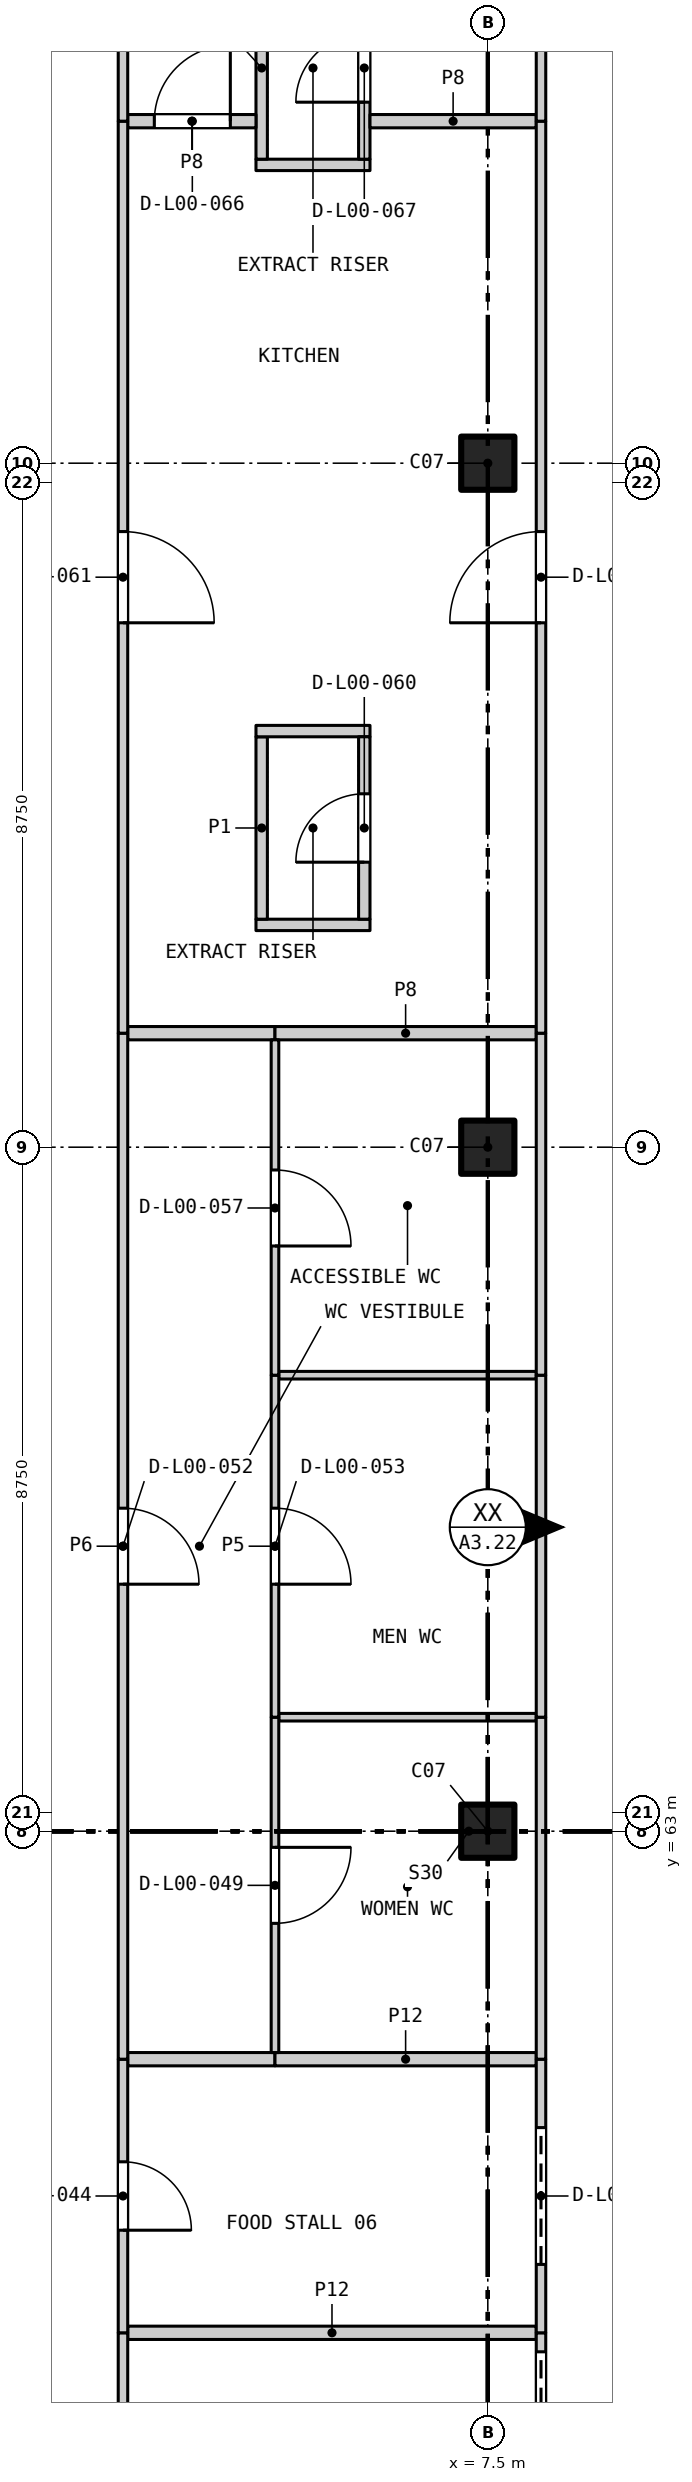
"""IFC4 building model, lengths in metres.
Left out: names, types, materials, properties, quantities, classifications, styles, units other than length and angle.
Written with IfcOpenShell. Run it as: python <this file> out.ifc"""

import sys

from ifc_helpers import new_model, si_unit, direction, frame, frame_2d, origin, origin_2d, place, context, subcontext, project, spatial, rectangle, extrude, element, fill, save


model = new_model("IFC4")
c1 = context("Model", 3, precision=1e-05, world=origin(), true_north=direction((0.0, 1.0)))
c2 = subcontext(c1, "Body", "Model", "MODEL_VIEW")
j1 = project(units=[si_unit("LENGTHUNIT", "METRE"), si_unit("PLANEANGLEUNIT", "RADIAN")], contexts=[c1])
p1 = place(None, origin())
s1 = spatial("IfcSite", under=j1, at=p1, CompositionType="ELEMENT")
p2 = place(p1, origin())
s2 = spatial("IfcBuilding", under=s1, at=p2, CompositionType="ELEMENT")
p3 = place(p2, origin())
s3 = spatial("IfcBuildingStorey", under=s2, at=p3, CompositionType="ELEMENT", Elevation=0.0)
for number, where, z_axis, x_axis in (
    (1, (7.5, 63.0, 0.0), (0.0, 0.0, 1.0), (1.0, 0.0, 0.0)),
    (2, (7.5, 72.0, 0.0), (0.0, 0.0, 1.0), (1.0, 0.0, 0.0)),
    (3, (7.5, 81.0, 0.0), (0.0, 0.0, 1.0), (1.0, 0.0, 0.0)),
):
    element("IfcColumn", number, at=place(p3, frame(where, z_axis=z_axis, x_axis=x_axis)), inside=s3, PredefinedType="COLUMN", context=c2, shape_type="SweptSolid", body=[
        extrude(rectangle(XDim=0.7, YDim=0.7, at=origin_2d()), origin(), (0.0, 0.0, 1.0), 6.0),
    ])
p4 = place(p3, frame((4.45, 74.925, 0.0), z_axis=(0.0, 0.0, 1.0), x_axis=(1.0, 0.0, 0.0)))
e4 = element("IfcWall", 4, at=p4, inside=s3, PredefinedType="PARTITIONING", context=c2, shape_type="SweptSolid", body=[
    extrude(rectangle(XDim=1.5, YDim=0.15, at=frame_2d((0.75, 0.0))), origin(), (0.0, 0.0, 1.0), 5.8),
])
p5 = place(p3, frame((4.525, 75.0, 0.0), z_axis=(0.0, 0.0, 1.0), x_axis=(0.0, 1.0, 0.0)))
e5 = element("IfcWall", 5, at=p5, inside=s3, PredefinedType="PARTITIONING", context=c2, shape_type="SweptSolid", body=[
    extrude(rectangle(XDim=2.4, YDim=0.15, at=frame_2d((1.2, 0.0))), origin(), (0.0, 0.0, 1.0), 5.8),
])
for number, where, z_axis, x_axis in (
    (6, (4.45, 77.475, 0.0), (0.0, 0.0, 1.0), (1.0, 0.0, 0.0)),
    (7, (4.45, 84.925, 0.0), (0.0, 0.0, 1.0), (1.0, 0.0, 0.0)),
):
    element("IfcWall", number, at=place(p3, frame(where, z_axis=z_axis, x_axis=x_axis)), inside=s3, PredefinedType="PARTITIONING", context=c2, shape_type="SweptSolid", body=[
        extrude(rectangle(XDim=1.5, YDim=0.15, at=frame_2d((0.75, 0.0))), origin(), (0.0, 0.0, 1.0), 5.8),
    ])
p6 = place(p3, frame((4.525, 85.0, 0.0), z_axis=(0.0, 0.0, 1.0), x_axis=(0.0, 1.0, 0.0)))
e8 = element("IfcWall", 8, at=p6, inside=s3, PredefinedType="PARTITIONING", context=c2, shape_type="SweptSolid", body=[
    extrude(rectangle(XDim=2.4, YDim=0.15, at=frame_2d((1.2, 0.0))), origin(), (0.0, 0.0, 1.0), 5.8),
])
p7 = place(p3, frame((5.875, 75.0, 0.0), z_axis=(0.0, 0.0, 1.0), x_axis=(0.0, 1.0, 0.0)))
e9 = element("IfcWall", 9, at=p7, inside=s3, PredefinedType="PARTITIONING", context=c2, shape_type="SweptSolid", body=[
    extrude(rectangle(XDim=2.4, YDim=0.15, at=frame_2d((1.2, 0.0))), origin(), (0.0, 0.0, 1.0), 5.8),
])
p8 = place(p7, frame((0.75, 0.0, 0.0)))
e10 = element("IfcOpeningElement", 10, at=p8, cuts=e9, PredefinedType="OPENING", context=c2, shape_type="SweptSolid", body=[
    extrude(rectangle(XDim=0.9, YDim=2.1, at=frame_2d((0.45, 1.05))), frame((0.0, 0.085, 0.0), z_axis=(0.0, -1.0, 0.0), x_axis=(1.0, 0.0, 0.0)), (0.0, 0.0, 1.0), 0.17),
])
p9 = place(p3, frame((5.875, 85.0, 0.0), z_axis=(0.0, 0.0, 1.0), x_axis=(0.0, 1.0, 0.0)))
e11 = element("IfcWall", 11, at=p9, inside=s3, PredefinedType="PARTITIONING", context=c2, shape_type="SweptSolid", body=[
    extrude(rectangle(XDim=2.4, YDim=0.15, at=frame_2d((1.2, 0.0))), origin(), (0.0, 0.0, 1.0), 5.8),
])
p10 = place(p9, frame((0.75, 0.0, 0.0)))
e12 = element("IfcOpeningElement", 12, at=p10, cuts=e11, PredefinedType="OPENING", context=c2, shape_type="SweptSolid", body=[
    extrude(rectangle(XDim=0.9, YDim=2.1, at=frame_2d((0.45, 1.05))), frame((0.0, 0.085, 0.0), z_axis=(0.0, -1.0, 0.0), x_axis=(1.0, 0.0, 0.0)), (0.0, 0.0, 1.0), 0.17),
])
p11 = place(p3, frame((2.762, 56.4, 0.0), z_axis=(0.0, 0.0, 1.0), x_axis=(1.0, 0.0, 0.0)))
e13 = element("IfcWall", 13, at=p11, inside=s3, PredefinedType="PARTITIONING", context=c2, shape_type="SweptSolid", body=[
    extrude(rectangle(XDim=5.375, YDim=0.175, at=frame_2d((2.688, 0.0))), origin(), (0.0, 0.0, 1.0), 3.0),
])
p12 = place(p3, frame((2.762, 60.0, 0.0), z_axis=(0.0, 0.0, 1.0), x_axis=(1.0, 0.0, 0.0)))
e14 = element("IfcWall", 14, at=p12, inside=s3, PredefinedType="PARTITIONING", context=c2, shape_type="SweptSolid", body=[
    extrude(rectangle(XDim=1.938, YDim=0.175, at=frame_2d((0.969, 0.0))), origin(), (0.0, 0.0, 1.0), 3.0),
])
p13 = place(p3, frame((4.7, 60.0, 0.0), z_axis=(0.0, 0.0, 1.0), x_axis=(1.0, 0.0, 0.0)))
e15 = element("IfcWall", 15, at=p13, inside=s3, PredefinedType="PARTITIONING", context=c2, shape_type="SweptSolid", body=[
    extrude(rectangle(XDim=3.438, YDim=0.175, at=frame_2d((1.719, 0.0))), origin(), (0.0, 0.0, 1.0), 3.0),
])
for number, where, z_axis, x_axis in (
    (16, (4.75, 64.5, 0.0), (0.0, 0.0, 1.0), (1.0, 0.0, 0.0)),
    (17, (4.75, 69.0, 0.0), (0.0, 0.0, 1.0), (1.0, 0.0, 0.0)),
):
    element("IfcWall", number, at=place(p3, frame(where, z_axis=z_axis, x_axis=x_axis)), inside=s3, PredefinedType="PARTITIONING", context=c2, shape_type="SweptSolid", body=[
        extrude(rectangle(XDim=3.387, YDim=0.1, at=frame_2d((1.694, 0.0))), origin(), (0.0, 0.0, 1.0), 5.8),
    ])
p14 = place(p3, frame((2.762, 73.5, 0.0), z_axis=(0.0, 0.0, 1.0), x_axis=(1.0, 0.0, 0.0)))
e18 = element("IfcWall", 18, at=p14, inside=s3, PredefinedType="PARTITIONING", context=c2, shape_type="SweptSolid", body=[
    extrude(rectangle(XDim=1.938, YDim=0.175, at=frame_2d((0.969, 0.0))), origin(), (0.0, 0.0, 1.0), 5.8),
])
p15 = place(p3, frame((4.7, 73.5, 0.0), z_axis=(0.0, 0.0, 1.0), x_axis=(1.0, 0.0, 0.0)))
e19 = element("IfcWall", 19, at=p15, inside=s3, PredefinedType="PARTITIONING", context=c2, shape_type="SweptSolid", body=[
    extrude(rectangle(XDim=3.438, YDim=0.175, at=frame_2d((1.719, 0.0))), origin(), (0.0, 0.0, 1.0), 5.8),
])
p16 = place(p3, frame((2.762, 85.5, 0.0), z_axis=(0.0, 0.0, 1.0), x_axis=(1.0, 0.0, 0.0)))
e20 = element("IfcWall", 20, at=p16, inside=s3, PredefinedType="PARTITIONING", context=c2, shape_type="SweptSolid", body=[
    extrude(rectangle(XDim=1.688, YDim=0.175, at=frame_2d((0.844, 0.0))), origin(), (0.0, 0.0, 1.0), 5.8),
])
p17 = place(p16, frame((0.35, 0.0, 0.0)))
e21 = element("IfcOpeningElement", 21, at=p17, cuts=e20, PredefinedType="OPENING", context=c2, shape_type="SweptSolid", body=[
    extrude(rectangle(XDim=1.0, YDim=2.1, at=frame_2d((0.5, 1.05))), frame((0.0, 0.097, 0.0), z_axis=(0.0, -1.0, 0.0), x_axis=(1.0, 0.0, 0.0)), (0.0, 0.0, 1.0), 0.195),
])
p18 = place(p3, frame((5.95, 85.5, 0.0), z_axis=(0.0, 0.0, 1.0), x_axis=(1.0, 0.0, 0.0)))
e22 = element("IfcWall", 22, at=p18, inside=s3, PredefinedType="PARTITIONING", context=c2, shape_type="SweptSolid", body=[
    extrude(rectangle(XDim=2.188, YDim=0.175, at=frame_2d((1.094, 0.0))), origin(), (0.0, 0.0, 1.0), 5.8),
])
p19 = place(p3, frame((2.7, 52.8, 0.0), z_axis=(0.0, 0.0, 1.0), x_axis=(0.0, 1.0, 0.0)))
e23 = element("IfcWall", 23, at=p19, inside=s3, PredefinedType="PARTITIONING", context=c2, shape_type="SweptSolid", body=[
    extrude(rectangle(XDim=3.6, YDim=0.125, at=frame_2d((1.8, 0.0))), origin(), (0.0, 0.0, 1.0), 3.0),
])
p20 = place(p19, frame((1.35, 0.0, 0.0)))
e24 = element("IfcOpeningElement", 24, at=p20, cuts=e23, PredefinedType="OPENING", context=c2, shape_type="SweptSolid", body=[
    extrude(rectangle(XDim=0.9, YDim=2.1, at=frame_2d((0.45, 1.05))), frame((0.0, 0.073, 0.0), z_axis=(0.0, -1.0, 0.0), x_axis=(1.0, 0.0, 0.0)), (0.0, 0.0, 1.0), 0.145),
])
p21 = place(p3, frame((2.7, 56.4, 0.0), z_axis=(0.0, 0.0, 1.0), x_axis=(0.0, 1.0, 0.0)))
e25 = element("IfcWall", 25, at=p21, inside=s3, PredefinedType="PARTITIONING", context=c2, shape_type="SweptSolid", body=[
    extrude(rectangle(XDim=3.6, YDim=0.125, at=frame_2d((1.8, 0.0))), origin(), (0.0, 0.0, 1.0), 3.0),
])
p22 = place(p21, frame((1.35, 0.0, 0.0)))
e26 = element("IfcOpeningElement", 26, at=p22, cuts=e25, PredefinedType="OPENING", context=c2, shape_type="SweptSolid", body=[
    extrude(rectangle(XDim=0.9, YDim=2.1, at=frame_2d((0.45, 1.05))), frame((0.0, 0.073, 0.0), z_axis=(0.0, -1.0, 0.0), x_axis=(1.0, 0.0, 0.0)), (0.0, 0.0, 1.0), 0.145),
])
p23 = place(p3, frame((2.7, 60.0, 0.0), z_axis=(0.0, 0.0, 1.0), x_axis=(0.0, 1.0, 0.0)))
e27 = element("IfcWall", 27, at=p23, inside=s3, PredefinedType="PARTITIONING", context=c2, shape_type="SweptSolid", body=[
    extrude(rectangle(XDim=13.5, YDim=0.125, at=frame_2d((6.75, 0.0))), origin(), (0.0, 0.0, 1.0), 5.8),
])
p24 = place(p23, frame((6.25, 0.0, 0.0)))
e28 = element("IfcOpeningElement", 28, at=p24, cuts=e27, PredefinedType="OPENING", context=c2, shape_type="SweptSolid", body=[
    extrude(rectangle(XDim=1.0, YDim=2.1, at=frame_2d((0.5, 1.05))), frame((0.0, 0.073, 0.0), z_axis=(0.0, -1.0, 0.0), x_axis=(1.0, 0.0, 0.0)), (0.0, 0.0, 1.0), 0.145),
])
p25 = place(p3, frame((2.7, 73.5, 0.0), z_axis=(0.0, 0.0, 1.0), x_axis=(0.0, 1.0, 0.0)))
e29 = element("IfcWall", 29, at=p25, inside=s3, PredefinedType="PARTITIONING", context=c2, shape_type="SweptSolid", body=[
    extrude(rectangle(XDim=12.0, YDim=0.125, at=frame_2d((6.0, 0.0))), origin(), (0.0, 0.0, 1.0), 5.8),
])
p26 = place(p25, frame((5.4, 0.0, 0.0)))
e30 = element("IfcOpeningElement", 30, at=p26, cuts=e29, PredefinedType="OPENING", context=c2, shape_type="SweptSolid", body=[
    extrude(rectangle(XDim=1.2, YDim=2.1, at=frame_2d((0.6, 1.05))), frame((0.0, 0.073, 0.0), z_axis=(0.0, -1.0, 0.0), x_axis=(1.0, 0.0, 0.0)), (0.0, 0.0, 1.0), 0.145),
])
p27 = place(p3, frame((2.7, 85.5, 0.0), z_axis=(0.0, 0.0, 1.0), x_axis=(0.0, 1.0, 0.0)))
e31 = element("IfcWall", 31, at=p27, inside=s3, PredefinedType="PARTITIONING", context=c2, shape_type="SweptSolid", body=[
    extrude(rectangle(XDim=3.438, YDim=0.125, at=frame_2d((1.719, 0.0))), origin(), (0.0, 0.0, 1.0), 5.8),
])
p28 = place(p3, frame((4.7, 60.087, 0.0), z_axis=(0.0, 0.0, 1.0), x_axis=(0.0, 1.0, 0.0)))
e32 = element("IfcWall", 32, at=p28, inside=s3, PredefinedType="PARTITIONING", context=c2, shape_type="SweptSolid", body=[
    extrude(rectangle(XDim=4.413, YDim=0.1, at=frame_2d((2.206, 0.0))), origin(), (0.0, 0.0, 1.0), 5.8),
])
p29 = place(p28, frame((1.7, 0.0, 0.0)))
e33 = element("IfcOpeningElement", 33, at=p29, cuts=e32, PredefinedType="OPENING", context=c2, shape_type="SweptSolid", body=[
    extrude(rectangle(XDim=1.0, YDim=2.1, at=frame_2d((0.5, 1.05))), frame((0.0, 0.06, 0.0), z_axis=(0.0, -1.0, 0.0), x_axis=(1.0, 0.0, 0.0)), (0.0, 0.0, 1.0), 0.12),
])
p30 = place(p3, frame((4.7, 64.5, 0.0), z_axis=(0.0, 0.0, 1.0), x_axis=(0.0, 1.0, 0.0)))
e34 = element("IfcWall", 34, at=p30, inside=s3, PredefinedType="PARTITIONING", context=c2, shape_type="SweptSolid", body=[
    extrude(rectangle(XDim=4.5, YDim=0.1, at=frame_2d((2.25, 0.0))), origin(), (0.0, 0.0, 1.0), 5.8),
])
p31 = place(p30, frame((1.75, 0.0, 0.0)))
e35 = element("IfcOpeningElement", 35, at=p31, cuts=e34, PredefinedType="OPENING", context=c2, shape_type="SweptSolid", body=[
    extrude(rectangle(XDim=1.0, YDim=2.1, at=frame_2d((0.5, 1.05))), frame((0.0, 0.06, 0.0), z_axis=(0.0, -1.0, 0.0), x_axis=(1.0, 0.0, 0.0)), (0.0, 0.0, 1.0), 0.12),
])
p32 = place(p3, frame((4.7, 69.0, 0.0), z_axis=(0.0, 0.0, 1.0), x_axis=(0.0, 1.0, 0.0)))
e36 = element("IfcWall", 36, at=p32, inside=s3, PredefinedType="PARTITIONING", context=c2, shape_type="SweptSolid", body=[
    extrude(rectangle(XDim=4.413, YDim=0.1, at=frame_2d((2.206, 0.0))), origin(), (0.0, 0.0, 1.0), 5.8),
])
p33 = place(p32, frame((1.7, 0.0, 0.0)))
e37 = element("IfcOpeningElement", 37, at=p33, cuts=e36, PredefinedType="OPENING", context=c2, shape_type="SweptSolid", body=[
    extrude(rectangle(XDim=1.0, YDim=2.1, at=frame_2d((0.5, 1.05))), frame((0.0, 0.06, 0.0), z_axis=(0.0, -1.0, 0.0), x_axis=(1.0, 0.0, 0.0)), (0.0, 0.0, 1.0), 0.12),
])
p34 = place(p3, frame((8.2, 52.8, 0.0), z_axis=(0.0, 0.0, 1.0), x_axis=(0.0, 1.0, 0.0)))
e38 = element("IfcWall", 38, at=p34, inside=s3, PredefinedType="PARTITIONING", context=c2, shape_type="SweptSolid", body=[
    extrude(rectangle(XDim=3.6, YDim=0.125, at=frame_2d((1.8, 0.0))), origin(), (0.0, 0.0, 1.0), 3.0),
])
p35 = place(p34, frame((1.55, 0.0, 0.0)))
e39 = element("IfcOpeningElement", 39, at=p35, cuts=e38, PredefinedType="OPENING", context=c2, shape_type="SweptSolid", body=[
    extrude(rectangle(XDim=1.8, YDim=2.4, at=frame_2d((0.9, 1.2))), frame((0.0, 0.073, 0.0), z_axis=(0.0, -1.0, 0.0), x_axis=(1.0, 0.0, 0.0)), (0.0, 0.0, 1.0), 0.145),
])
p36 = place(p3, frame((8.2, 56.4, 0.0), z_axis=(0.0, 0.0, 1.0), x_axis=(0.0, 1.0, 0.0)))
e40 = element("IfcWall", 40, at=p36, inside=s3, PredefinedType="PARTITIONING", context=c2, shape_type="SweptSolid", body=[
    extrude(rectangle(XDim=3.6, YDim=0.125, at=frame_2d((1.8, 0.0))), origin(), (0.0, 0.0, 1.0), 3.0),
])
p37 = place(p36, frame((0.9, 0.0, 0.0)))
e41 = element("IfcOpeningElement", 41, at=p37, cuts=e40, PredefinedType="OPENING", context=c2, shape_type="SweptSolid", body=[
    extrude(rectangle(XDim=1.8, YDim=2.4, at=frame_2d((0.9, 1.2))), frame((0.0, 0.073, 0.0), z_axis=(0.0, -1.0, 0.0), x_axis=(1.0, 0.0, 0.0)), (0.0, 0.0, 1.0), 0.145),
])
for number, where, z_axis, x_axis in (
    (42, (8.2, 60.0, 0.0), (0.0, 0.0, 1.0), (0.0, 1.0, 0.0)),
    (43, (8.2, 64.5, 0.0), (0.0, 0.0, 1.0), (0.0, 1.0, 0.0)),
    (44, (8.2, 69.0, 0.0), (0.0, 0.0, 1.0), (0.0, 1.0, 0.0)),
):
    element("IfcWall", number, at=place(p3, frame(where, z_axis=z_axis, x_axis=x_axis)), inside=s3, PredefinedType="PARTITIONING", context=c2, shape_type="SweptSolid", body=[
        extrude(rectangle(XDim=4.5, YDim=0.125, at=frame_2d((2.25, 0.0))), origin(), (0.0, 0.0, 1.0), 5.8),
    ])
p38 = place(p3, frame((8.2, 73.5, 0.0), z_axis=(0.0, 0.0, 1.0), x_axis=(0.0, 1.0, 0.0)))
e45 = element("IfcWall", 45, at=p38, inside=s3, PredefinedType="PARTITIONING", context=c2, shape_type="SweptSolid", body=[
    extrude(rectangle(XDim=12.0, YDim=0.125, at=frame_2d((6.0, 0.0))), origin(), (0.0, 0.0, 1.0), 5.8),
])
p39 = place(p38, frame((5.4, 0.0, 0.0)))
e46 = element("IfcOpeningElement", 46, at=p39, cuts=e45, PredefinedType="OPENING", context=c2, shape_type="SweptSolid", body=[
    extrude(rectangle(XDim=1.2, YDim=2.1, at=frame_2d((0.6, 1.05))), frame((0.0, 0.073, 0.0), z_axis=(0.0, -1.0, 0.0), x_axis=(1.0, 0.0, 0.0)), (0.0, 0.0, 1.0), 0.145),
])
p40 = place(p3, frame((8.2, 85.5, 0.0), z_axis=(0.0, 0.0, 1.0), x_axis=(0.0, 1.0, 0.0)))
e47 = element("IfcWall", 47, at=p40, inside=s3, PredefinedType="PARTITIONING", context=c2, shape_type="SweptSolid", body=[
    extrude(rectangle(XDim=3.5, YDim=0.125, at=frame_2d((1.75, 0.0))), origin(), (0.0, 0.0, 1.0), 5.8),
])
p41 = place(p35, origin())
e48 = element("IfcDoor", 48, at=p41, inside=s3, OperationType="ROLLINGUP", PredefinedType="DOOR", context=c2, shape_type="SweptSolid", body=[
    extrude(rectangle(XDim=1.8, YDim=2.4, at=frame_2d((0.9, 1.2))), frame((0.0, 0.025, 0.0), z_axis=(0.0, -1.0, 0.0), x_axis=(1.0, 0.0, 0.0)), (0.0, 0.0, 1.0), 0.05),
])
fill(e39, e48)
p42 = place(p22, frame((0.9, 0.0, 0.0), z_axis=(0.0, 0.0, 1.0), x_axis=(-1.0, 0.0, 0.0)))
e49 = element("IfcDoor", 49, at=p42, inside=s3, OperationType="SINGLE_SWING_RIGHT", PredefinedType="DOOR", context=c2, shape_type="SweptSolid", body=[
    extrude(rectangle(XDim=0.9, YDim=2.1, at=frame_2d((0.45, 1.05))), frame((0.0, 0.025, 0.0), z_axis=(0.0, -1.0, 0.0), x_axis=(1.0, 0.0, 0.0)), (0.0, 0.0, 1.0), 0.05),
])
fill(e26, e49)
p43 = place(p37, origin())
e50 = element("IfcDoor", 50, at=p43, inside=s3, OperationType="ROLLINGUP", PredefinedType="DOOR", context=c2, shape_type="SweptSolid", body=[
    extrude(rectangle(XDim=1.8, YDim=2.4, at=frame_2d((0.9, 1.2))), frame((0.0, 0.025, 0.0), z_axis=(0.0, -1.0, 0.0), x_axis=(1.0, 0.0, 0.0)), (0.0, 0.0, 1.0), 0.05),
])
fill(e41, e50)
p44 = place(p29, frame((1.0, 0.0, 0.0), z_axis=(0.0, 0.0, 1.0), x_axis=(-1.0, 0.0, 0.0)))
e51 = element("IfcDoor", 51, at=p44, inside=s3, OperationType="SINGLE_SWING_LEFT", PredefinedType="DOOR", context=c2, shape_type="SweptSolid", body=[
    extrude(rectangle(XDim=1.0, YDim=2.1, at=frame_2d((0.5, 1.05))), frame((0.0, 0.025, 0.0), z_axis=(0.0, -1.0, 0.0), x_axis=(1.0, 0.0, 0.0)), (0.0, 0.0, 1.0), 0.05),
])
fill(e33, e51)
p45 = place(p24, frame((1.0, 0.0, 0.0), z_axis=(0.0, 0.0, 1.0), x_axis=(-1.0, 0.0, 0.0)))
e52 = element("IfcDoor", 52, at=p45, inside=s3, OperationType="SINGLE_SWING_RIGHT", PredefinedType="DOOR", context=c2, shape_type="SweptSolid", body=[
    extrude(rectangle(XDim=1.0, YDim=2.1, at=frame_2d((0.5, 1.05))), frame((0.0, 0.025, 0.0), z_axis=(0.0, -1.0, 0.0), x_axis=(1.0, 0.0, 0.0)), (0.0, 0.0, 1.0), 0.05),
])
fill(e28, e52)
p46 = place(p31, frame((1.0, 0.0, 0.0), z_axis=(0.0, 0.0, 1.0), x_axis=(-1.0, 0.0, 0.0)))
e53 = element("IfcDoor", 53, at=p46, inside=s3, OperationType="SINGLE_SWING_RIGHT", PredefinedType="DOOR", context=c2, shape_type="SweptSolid", body=[
    extrude(rectangle(XDim=1.0, YDim=2.1, at=frame_2d((0.5, 1.05))), frame((0.0, 0.025, 0.0), z_axis=(0.0, -1.0, 0.0), x_axis=(1.0, 0.0, 0.0)), (0.0, 0.0, 1.0), 0.05),
])
fill(e35, e53)
p47 = place(p33, frame((1.0, 0.0, 0.0), z_axis=(0.0, 0.0, 1.0), x_axis=(-1.0, 0.0, 0.0)))
e54 = element("IfcDoor", 54, at=p47, inside=s3, OperationType="SINGLE_SWING_RIGHT", PredefinedType="DOOR", context=c2, shape_type="SweptSolid", body=[
    extrude(rectangle(XDim=1.0, YDim=2.1, at=frame_2d((0.5, 1.05))), frame((0.0, 0.025, 0.0), z_axis=(0.0, -1.0, 0.0), x_axis=(1.0, 0.0, 0.0)), (0.0, 0.0, 1.0), 0.05),
])
fill(e37, e54)
p48 = place(p8, origin())
e55 = element("IfcDoor", 55, at=p48, inside=s3, OperationType="SINGLE_SWING_LEFT", PredefinedType="DOOR", context=c2, shape_type="SweptSolid", body=[
    extrude(rectangle(XDim=0.9, YDim=2.1, at=frame_2d((0.45, 1.05))), frame((0.0, 0.025, 0.0), z_axis=(0.0, -1.0, 0.0), x_axis=(1.0, 0.0, 0.0)), (0.0, 0.0, 1.0), 0.05),
])
fill(e10, e55)
p49 = place(p26, frame((1.2, 0.0, 0.0), z_axis=(0.0, 0.0, 1.0), x_axis=(-1.0, 0.0, 0.0)))
e56 = element("IfcDoor", 56, at=p49, inside=s3, OperationType="SINGLE_SWING_RIGHT", PredefinedType="DOOR", context=c2, shape_type="SweptSolid", body=[
    extrude(rectangle(XDim=1.2, YDim=2.1, at=frame_2d((0.6, 1.05))), frame((0.0, 0.025, 0.0), z_axis=(0.0, -1.0, 0.0), x_axis=(1.0, 0.0, 0.0)), (0.0, 0.0, 1.0), 0.05),
])
fill(e30, e56)
p50 = place(p39, origin())
e57 = element("IfcDoor", 57, at=p50, inside=s3, OperationType="SINGLE_SWING_LEFT", PredefinedType="DOOR", context=c2, shape_type="SweptSolid", body=[
    extrude(rectangle(XDim=1.2, YDim=2.1, at=frame_2d((0.6, 1.05))), frame((0.0, 0.025, 0.0), z_axis=(0.0, -1.0, 0.0), x_axis=(1.0, 0.0, 0.0)), (0.0, 0.0, 1.0), 0.05),
])
fill(e46, e57)
p51 = place(p17, origin())
e58 = element("IfcDoor", 58, at=p51, inside=s3, OperationType="SINGLE_SWING_RIGHT", PredefinedType="DOOR", context=c2, shape_type="SweptSolid", body=[
    extrude(rectangle(XDim=1.0, YDim=2.1, at=frame_2d((0.5, 1.05))), frame((0.0, 0.025, 0.0), z_axis=(0.0, -1.0, 0.0), x_axis=(1.0, 0.0, 0.0)), (0.0, 0.0, 1.0), 0.05),
])
fill(e21, e58)
p52 = place(p10, origin())
e59 = element("IfcDoor", 59, at=p52, inside=s3, OperationType="SINGLE_SWING_LEFT", PredefinedType="DOOR", context=c2, shape_type="SweptSolid", body=[
    extrude(rectangle(XDim=0.9, YDim=2.1, at=frame_2d((0.45, 1.05))), frame((0.0, 0.025, 0.0), z_axis=(0.0, -1.0, 0.0), x_axis=(1.0, 0.0, 0.0)), (0.0, 0.0, 1.0), 0.05),
])
fill(e12, e59)
save(model, sys.argv[1])
